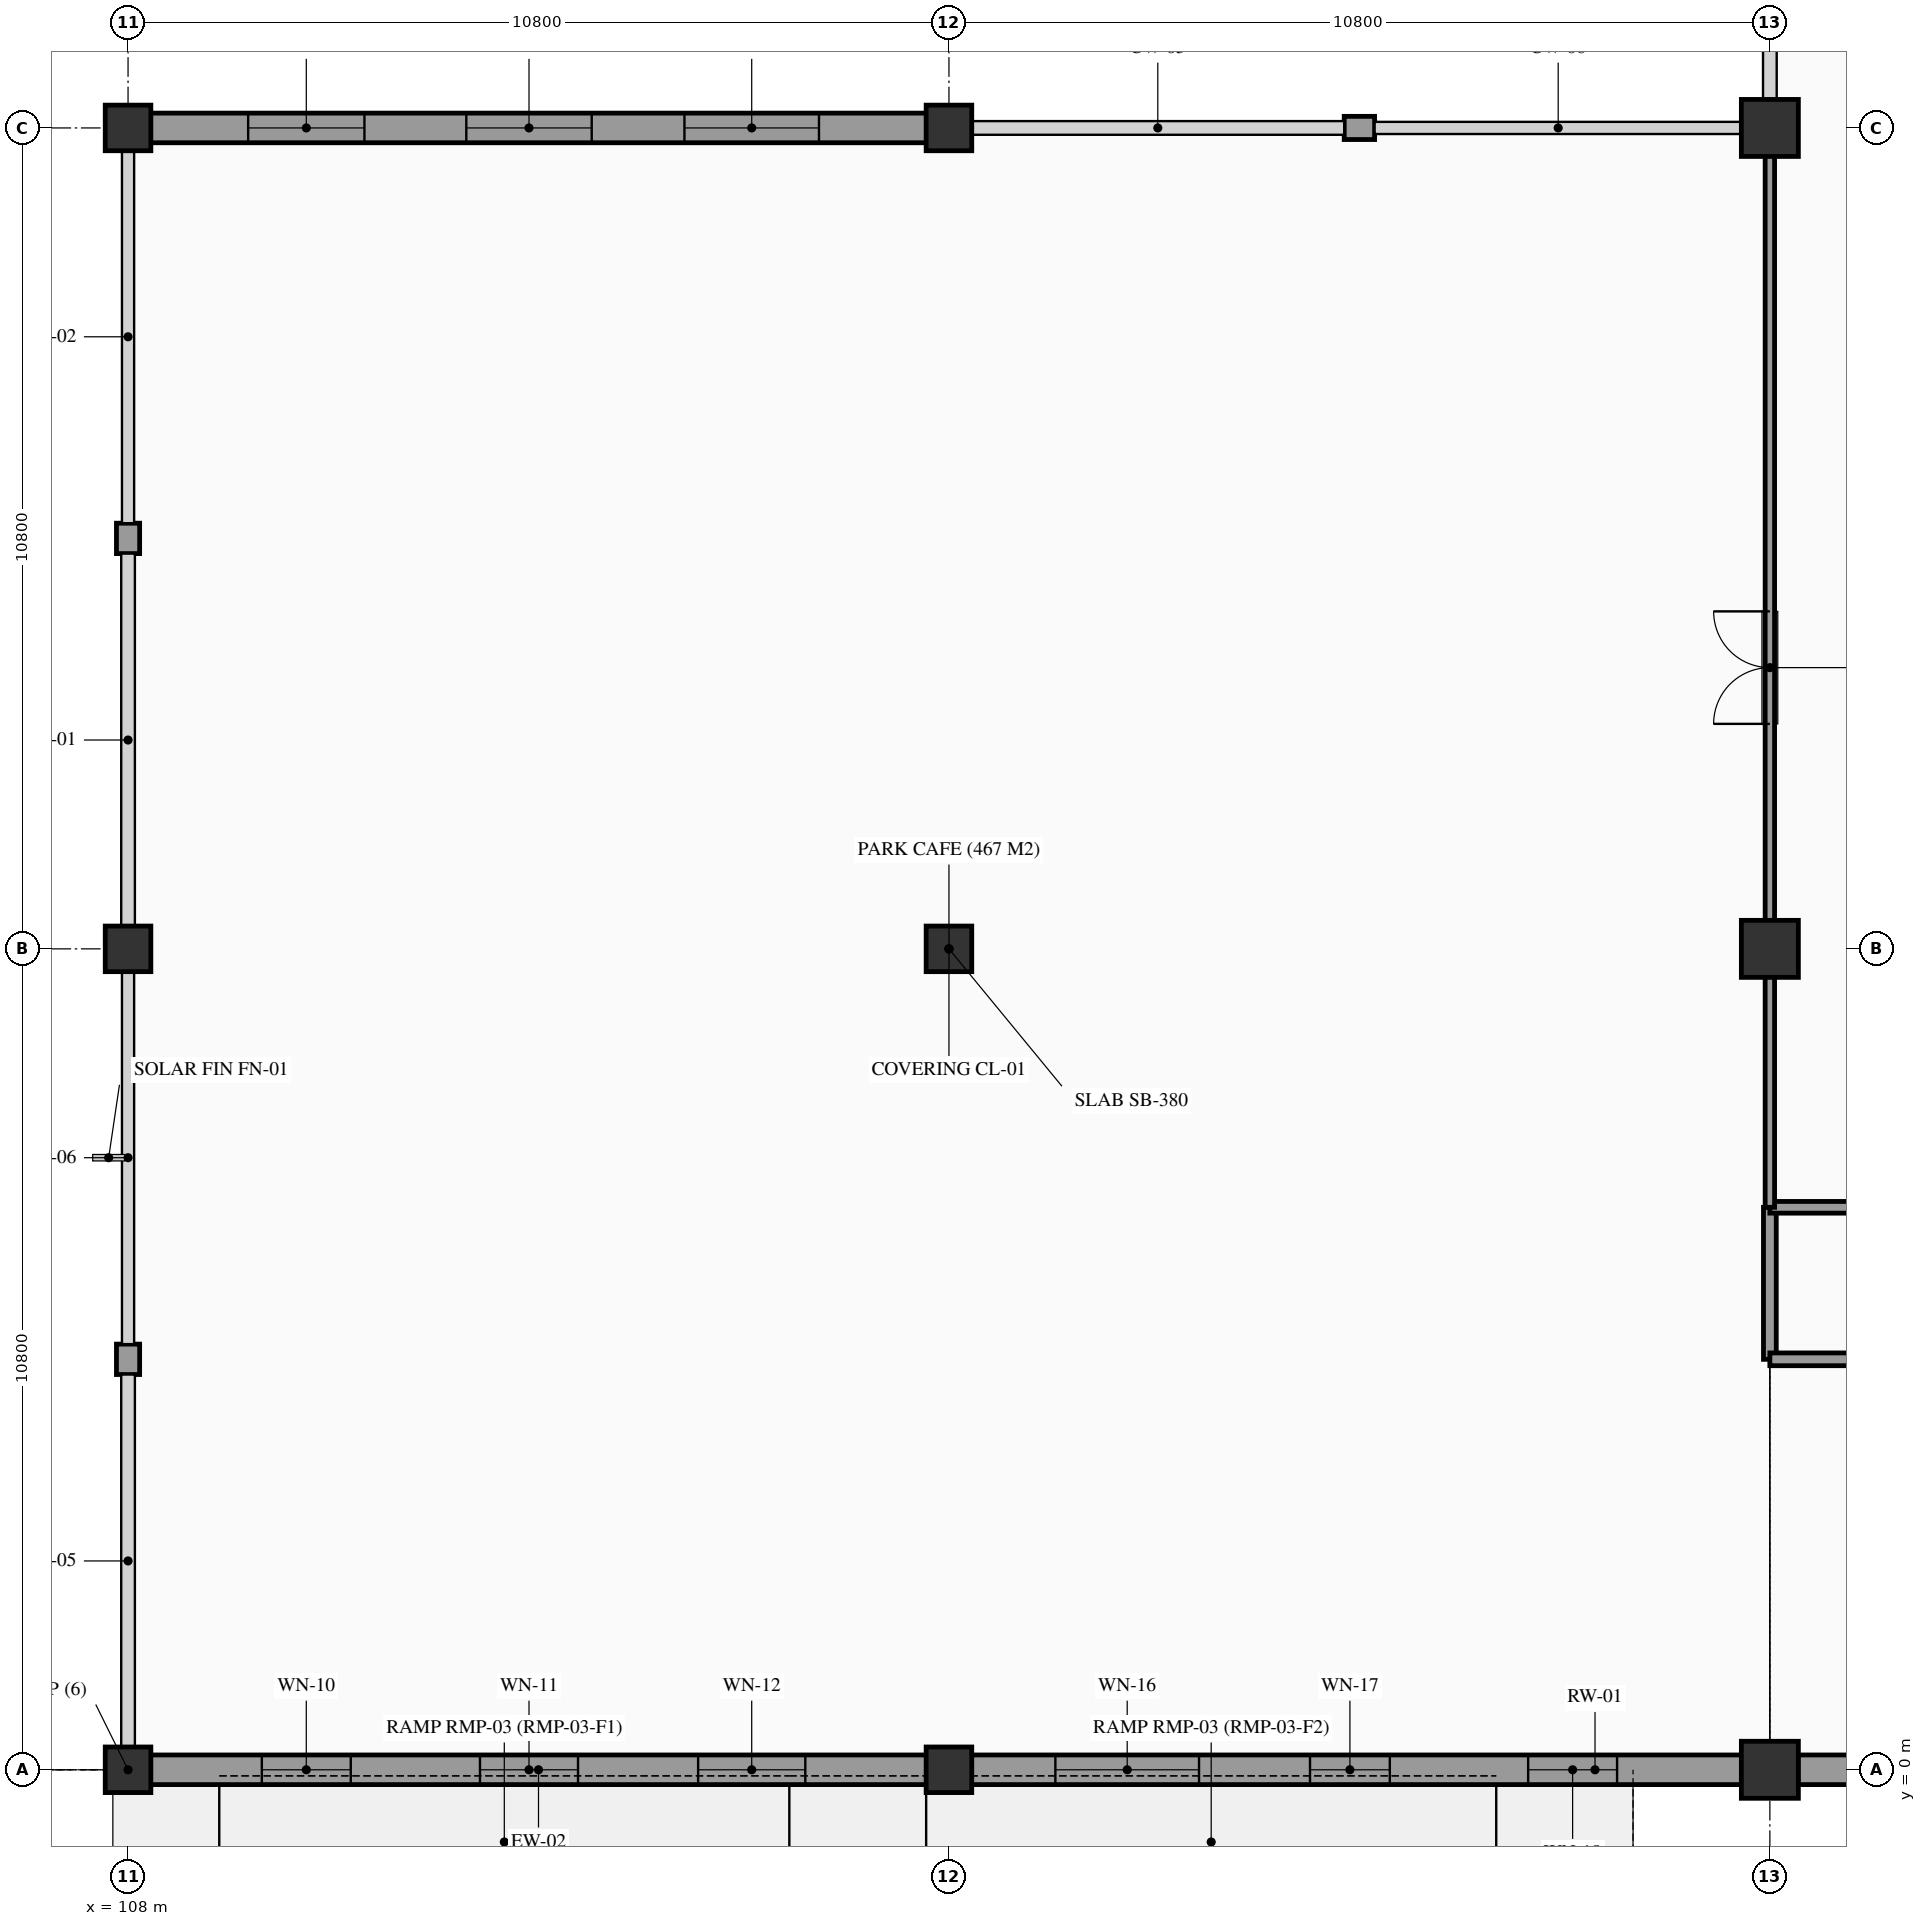
"""IFC4 building model, lengths in metres.
Left out: names, types, materials, properties, quantities, classifications, styles, units other than length and angle.
Written with IfcOpenShell. Run it as: python <this file> out.ifc"""

import sys

from ifc_helpers import new_model, si_unit, direction, frame, frame_2d, origin, origin_2d, place, context, subcontext, project, spatial, rectangle, extrude, element, fill, save


model = new_model("IFC4")
c1 = context("Model", 3, precision=1e-05, world=origin(), true_north=direction((0.0, 1.0)))
c2 = subcontext(c1, "Body", "Model", "MODEL_VIEW")
j1 = project(units=[si_unit("LENGTHUNIT", "METRE"), si_unit("PLANEANGLEUNIT", "RADIAN")], contexts=[c1])
p1 = place(None, origin())
s1 = spatial("IfcSite", under=j1, at=p1, CompositionType="ELEMENT")
p2 = place(p1, origin())
s2 = spatial("IfcBuilding", under=s1, at=p2, CompositionType="ELEMENT")
p3 = place(p2, origin())
s3 = spatial("IfcBuildingStorey", under=s2, at=p3, CompositionType="ELEMENT", Elevation=0.0)
for number, where, z_axis, x_axis in (
    (1, (108.0, 0.0, -1.2), (0.0, 0.0, 1.0), (1.0, 0.0, 0.0)),
    (2, (108.0, 10.8, -1.2), (0.0, 0.0, 1.0), (1.0, 0.0, 0.0)),
    (3, (108.0, 21.6, -1.2), (0.0, 0.0, 1.0), (1.0, 0.0, 0.0)),
    (4, (118.8, 0.0, -1.2), (0.0, 0.0, 1.0), (1.0, 0.0, 0.0)),
    (5, (118.8, 10.8, -1.2), (0.0, 0.0, 1.0), (1.0, 0.0, 0.0)),
    (6, (118.8, 21.6, -1.2), (0.0, 0.0, 1.0), (1.0, 0.0, 0.0)),
):
    element("IfcColumn", number, at=place(p3, frame(where, z_axis=z_axis, x_axis=x_axis)), inside=s3, PredefinedType="COLUMN", context=c2, shape_type="SweptSolid", body=[
        extrude(rectangle(XDim=0.6, YDim=0.6, at=origin_2d()), origin(), (0.0, 0.0, 1.0), 6.6),
    ])
for number, where, z_axis, x_axis in (
    (7, (129.6, 0.0, -1.2), (0.0, 0.0, 1.0), (1.0, 0.0, 0.0)),
    (8, (129.6, 10.8, -1.2), (0.0, 0.0, 1.0), (1.0, 0.0, 0.0)),
    (9, (129.6, 21.6, -1.2), (0.0, 0.0, 1.0), (1.0, 0.0, 0.0)),
):
    element("IfcColumn", number, at=place(p3, frame(where, z_axis=z_axis, x_axis=x_axis)), inside=s3, PredefinedType="COLUMN", context=c2, shape_type="SweptSolid", body=[
        extrude(rectangle(XDim=0.75, YDim=0.75, at=origin_2d()), origin(), (0.0, 0.0, 1.0), 6.6),
    ])
p4 = place(p3, frame((108.45, 0.0, -1.2), z_axis=(0.0, 0.0, 1.0), x_axis=(1.0, 0.0, 0.0)))
e10 = element("IfcWall", 10, at=p4, inside=s3, PredefinedType="USERDEFINED", context=c2, shape_type="SweptSolid", body=[
    extrude(rectangle(XDim=107.1, YDim=0.334, at=frame_2d((53.55, 0.0))), origin(), (0.0, 0.0, 1.0), 0.14),
])
p5 = place(p3, frame((108.295, 0.0, 0.0), z_axis=(0.0, 0.0, 1.0), x_axis=(1.0, 0.0, 0.0)))
e11 = element("IfcWall", 11, at=p5, inside=s3, PredefinedType="STANDARD", context=c2, shape_type="SweptSolid", body=[
    extrude(rectangle(XDim=10.21, YDim=0.39, at=frame_2d((5.105, 0.0))), origin(), (0.0, 0.0, 1.0), 4.198),
])
p6 = place(p5, frame((1.465, 0.0, 0.95)))
e12 = element("IfcOpeningElement", 12, at=p6, cuts=e11, PredefinedType="OPENING", context=c2, shape_type="SweptSolid", body=[
    extrude(rectangle(XDim=1.17, YDim=1.05, at=frame_2d((0.585, 0.525))), frame((0.0, 0.205, 0.0), z_axis=(0.0, -1.0, 0.0), x_axis=(1.0, 0.0, 0.0)), (0.0, 0.0, 1.0), 0.41),
])
p7 = place(p5, frame((4.335, 0.0, 0.95)))
e13 = element("IfcOpeningElement", 13, at=p7, cuts=e11, PredefinedType="OPENING", context=c2, shape_type="SweptSolid", body=[
    extrude(rectangle(XDim=1.29, YDim=1.05, at=frame_2d((0.645, 0.525))), frame((0.0, 0.205, 0.0), z_axis=(0.0, -1.0, 0.0), x_axis=(1.0, 0.0, 0.0)), (0.0, 0.0, 1.0), 0.41),
])
p8 = place(p5, frame((7.205, 0.0, 0.95)))
e14 = element("IfcOpeningElement", 14, at=p8, cuts=e11, PredefinedType="OPENING", context=c2, shape_type="SweptSolid", body=[
    extrude(rectangle(XDim=1.41, YDim=1.05, at=frame_2d((0.705, 0.525))), frame((0.0, 0.205, 0.0), z_axis=(0.0, -1.0, 0.0), x_axis=(1.0, 0.0, 0.0)), (0.0, 0.0, 1.0), 0.41),
])
p9 = place(p3, frame((108.0, 5.2, 0.0), z_axis=(0.0, 0.0, 1.0), x_axis=(0.0, 1.0, 0.0)))
e15 = element("IfcWall", 15, at=p9, inside=s3, PredefinedType="STANDARD", context=c2, shape_type="SweptSolid", body=[
    extrude(rectangle(XDim=0.4, YDim=0.305, at=frame_2d((0.2, 0.0))), origin(), (0.0, 0.0, 1.0), 4.25),
])
p10 = place(p3, frame((108.295, 21.6, 0.0), z_axis=(0.0, 0.0, 1.0), x_axis=(1.0, 0.0, 0.0)))
e16 = element("IfcWall", 16, at=p10, inside=s3, PredefinedType="STANDARD", context=c2, shape_type="SweptSolid", body=[
    extrude(rectangle(XDim=10.21, YDim=0.39, at=frame_2d((5.105, 0.0))), origin(), (0.0, 0.0, 1.0), 4.198),
])
p11 = place(p10, frame((1.285, 0.0, 0.95)))
e17 = element("IfcOpeningElement", 17, at=p11, cuts=e16, PredefinedType="OPENING", context=c2, shape_type="SweptSolid", body=[
    extrude(rectangle(XDim=1.53, YDim=1.05, at=frame_2d((0.765, 0.525))), frame((0.0, 0.205, 0.0), z_axis=(0.0, -1.0, 0.0), x_axis=(1.0, 0.0, 0.0)), (0.0, 0.0, 1.0), 0.41),
])
p12 = place(p10, frame((4.155, 0.0, 0.95)))
e18 = element("IfcOpeningElement", 18, at=p12, cuts=e16, PredefinedType="OPENING", context=c2, shape_type="SweptSolid", body=[
    extrude(rectangle(XDim=1.65, YDim=1.05, at=frame_2d((0.825, 0.525))), frame((0.0, 0.205, 0.0), z_axis=(0.0, -1.0, 0.0), x_axis=(1.0, 0.0, 0.0)), (0.0, 0.0, 1.0), 0.41),
])
p13 = place(p10, frame((7.025, 0.0, 0.95)))
e19 = element("IfcOpeningElement", 19, at=p13, cuts=e16, PredefinedType="OPENING", context=c2, shape_type="SweptSolid", body=[
    extrude(rectangle(XDim=1.77, YDim=1.05, at=frame_2d((0.885, 0.525))), frame((0.0, 0.205, 0.0), z_axis=(0.0, -1.0, 0.0), x_axis=(1.0, 0.0, 0.0)), (0.0, 0.0, 1.0), 0.41),
])
p14 = place(p3, frame((108.0, 16.0, 0.0), z_axis=(0.0, 0.0, 1.0), x_axis=(0.0, 1.0, 0.0)))
e20 = element("IfcWall", 20, at=p14, inside=s3, PredefinedType="STANDARD", context=c2, shape_type="SweptSolid", body=[
    extrude(rectangle(XDim=0.4, YDim=0.305, at=frame_2d((0.2, 0.0))), origin(), (0.0, 0.0, 1.0), 4.25),
])
p15 = place(p3, frame((119.095, 0.0, 0.0), z_axis=(0.0, 0.0, 1.0), x_axis=(1.0, 0.0, 0.0)))
e21 = element("IfcWall", 21, at=p15, inside=s3, PredefinedType="STANDARD", context=c2, shape_type="SweptSolid", body=[
    extrude(rectangle(XDim=10.135, YDim=0.39, at=frame_2d((5.067, 0.0))), origin(), (0.0, 0.0, 1.0), 4.198),
])
p16 = place(p15, frame((1.105, 0.0, 0.95)))
e22 = element("IfcOpeningElement", 22, at=p16, cuts=e21, PredefinedType="OPENING", context=c2, shape_type="SweptSolid", body=[
    extrude(rectangle(XDim=1.89, YDim=1.05, at=frame_2d((0.945, 0.525))), frame((0.0, 0.205, 0.0), z_axis=(0.0, -1.0, 0.0), x_axis=(1.0, 0.0, 0.0)), (0.0, 0.0, 1.0), 0.41),
])
p17 = place(p15, frame((4.455, 0.0, 0.95)))
e23 = element("IfcOpeningElement", 23, at=p17, cuts=e21, PredefinedType="OPENING", context=c2, shape_type="SweptSolid", body=[
    extrude(rectangle(XDim=1.05, YDim=1.2, at=frame_2d((0.525, 0.6))), frame((0.0, 0.205, 0.0), z_axis=(0.0, -1.0, 0.0), x_axis=(1.0, 0.0, 0.0)), (0.0, 0.0, 1.0), 0.41),
])
p18 = place(p15, frame((7.325, 0.0, 0.95)))
e24 = element("IfcOpeningElement", 24, at=p18, cuts=e21, PredefinedType="OPENING", context=c2, shape_type="SweptSolid", body=[
    extrude(rectangle(XDim=1.17, YDim=1.2, at=frame_2d((0.585, 0.6))), frame((0.0, 0.205, 0.0), z_axis=(0.0, -1.0, 0.0), x_axis=(1.0, 0.0, 0.0)), (0.0, 0.0, 1.0), 0.41),
])
p19 = place(p3, frame((124.0, 21.6, 0.0), z_axis=(0.0, 0.0, 1.0), x_axis=(1.0, 0.0, 0.0)))
e25 = element("IfcWall", 25, at=p19, inside=s3, PredefinedType="STANDARD", context=c2, shape_type="SweptSolid", body=[
    extrude(rectangle(XDim=0.4, YDim=0.305, at=frame_2d((0.2, 0.0))), origin(), (0.0, 0.0, 1.0), 4.198),
])
p20 = place(p3, frame((129.97, 0.0, 0.0), z_axis=(0.0, 0.0, 1.0), x_axis=(1.0, 0.0, 0.0)))
e26 = element("IfcWall", 26, at=p20, inside=s3, PredefinedType="STANDARD", context=c2, shape_type="SweptSolid", body=[
    extrude(rectangle(XDim=10.06, YDim=0.39, at=frame_2d((5.03, 0.0))), origin(), (0.0, 0.0, 1.0), 4.198),
])
p21 = place(p20, frame((4.07, 0.0, 0.0)))
e27 = element("IfcOpeningElement", 27, at=p21, cuts=e26, PredefinedType="OPENING", context=c2, shape_type="SweptSolid", body=[
    extrude(rectangle(XDim=1.92, YDim=2.35, at=frame_2d((0.96, 1.175))), frame((0.0, 0.205, 0.0), z_axis=(0.0, -1.0, 0.0), x_axis=(1.0, 0.0, 0.0)), (0.0, 0.0, 1.0), 0.41),
])
p22 = place(p3, frame((129.6, 5.4, 0.0), z_axis=(0.0, 0.0, 1.0), x_axis=(0.0, 1.0, 0.0)))
e28 = element("IfcWall", 28, at=p22, inside=s3, PredefinedType="PARTITIONING", context=c2, shape_type="SweptSolid", body=[
    extrude(rectangle(XDim=2.0, YDim=0.168, at=frame_2d((1.0, 0.0))), origin(), (0.0, 0.0, 1.0), 3.95),
])
p23 = place(p3, frame((129.6, 7.4, 0.0), z_axis=(0.0, 0.0, 1.0), x_axis=(1.0, 0.0, 0.0)))
e29 = element("IfcWall", 29, at=p23, inside=s3, PredefinedType="PARTITIONING", context=c2, shape_type="SweptSolid", body=[
    extrude(rectangle(XDim=21.6, YDim=0.154, at=frame_2d((10.8, 0.0))), origin(), (0.0, 0.0, 1.0), 3.95),
])
p24 = place(p3, frame((129.6, 5.4, 0.0), z_axis=(0.0, 0.0, 1.0), x_axis=(1.0, 0.0, 0.0)))
e30 = element("IfcWall", 30, at=p24, inside=s3, PredefinedType="PARTITIONING", context=c2, shape_type="SweptSolid", body=[
    extrude(rectangle(XDim=1.93, YDim=0.168, at=frame_2d((0.965, 0.0))), origin(), (0.0, 0.0, 1.0), 3.95),
])
p25 = place(p3, frame((129.6, 7.4, 0.0), z_axis=(0.0, 0.0, 1.0), x_axis=(0.0, 1.0, 0.0)))
e31 = element("IfcWall", 31, at=p25, inside=s3, PredefinedType="PARTITIONING", context=c2, shape_type="SweptSolid", body=[
    extrude(rectangle(XDim=14.2, YDim=0.124, at=frame_2d((7.1, 0.0))), origin(), (0.0, 0.0, 1.0), 3.95),
])
p26 = place(p25, frame((6.36, 0.0, 0.0)))
e32 = element("IfcOpeningElement", 32, at=p26, cuts=e31, PredefinedType="OPENING", context=c2, shape_type="SweptSolid", body=[
    extrude(rectangle(XDim=1.48, YDim=2.2, at=frame_2d((0.74, 1.1))), frame((0.0, 0.072, 0.0), z_axis=(0.0, -1.0, 0.0), x_axis=(1.0, 0.0, 0.0)), (0.0, 0.0, 1.0), 0.144),
])
p27 = place(p6, frame((1.17, 0.0, 0.0), z_axis=(0.0, 0.0, 1.0), x_axis=(-1.0, 0.0, 0.0)))
e33 = element("IfcWindow", 33, at=p27, inside=s3, PartitioningType="SINGLE_PANEL", PredefinedType="WINDOW", context=c2, shape_type="SweptSolid", body=[
    extrude(rectangle(XDim=1.17, YDim=1.05, at=frame_2d((0.585, 0.525))), frame((0.0, 0.03, 0.0), z_axis=(0.0, -1.0, 0.0), x_axis=(1.0, 0.0, 0.0)), (0.0, 0.0, 1.0), 0.06),
])
fill(e12, e33)
p28 = place(p7, frame((1.29, 0.0, 0.0), z_axis=(0.0, 0.0, 1.0), x_axis=(-1.0, 0.0, 0.0)))
e34 = element("IfcWindow", 34, at=p28, inside=s3, PartitioningType="SINGLE_PANEL", PredefinedType="WINDOW", context=c2, shape_type="SweptSolid", body=[
    extrude(rectangle(XDim=1.29, YDim=1.05, at=frame_2d((0.645, 0.525))), frame((0.0, 0.03, 0.0), z_axis=(0.0, -1.0, 0.0), x_axis=(1.0, 0.0, 0.0)), (0.0, 0.0, 1.0), 0.06),
])
fill(e13, e34)
p29 = place(p8, frame((1.41, 0.0, 0.0), z_axis=(0.0, 0.0, 1.0), x_axis=(-1.0, 0.0, 0.0)))
e35 = element("IfcWindow", 35, at=p29, inside=s3, PartitioningType="SINGLE_PANEL", PredefinedType="WINDOW", context=c2, shape_type="SweptSolid", body=[
    extrude(rectangle(XDim=1.41, YDim=1.05, at=frame_2d((0.705, 0.525))), frame((0.0, 0.03, 0.0), z_axis=(0.0, -1.0, 0.0), x_axis=(1.0, 0.0, 0.0)), (0.0, 0.0, 1.0), 0.06),
])
fill(e14, e35)
p30 = place(p11, origin())
e36 = element("IfcWindow", 36, at=p30, inside=s3, PartitioningType="SINGLE_PANEL", PredefinedType="WINDOW", context=c2, shape_type="SweptSolid", body=[
    extrude(rectangle(XDim=1.53, YDim=1.05, at=frame_2d((0.765, 0.525))), frame((0.0, 0.03, 0.0), z_axis=(0.0, -1.0, 0.0), x_axis=(1.0, 0.0, 0.0)), (0.0, 0.0, 1.0), 0.06),
])
fill(e17, e36)
p31 = place(p12, origin())
e37 = element("IfcWindow", 37, at=p31, inside=s3, PartitioningType="SINGLE_PANEL", PredefinedType="WINDOW", context=c2, shape_type="SweptSolid", body=[
    extrude(rectangle(XDim=1.65, YDim=1.05, at=frame_2d((0.825, 0.525))), frame((0.0, 0.03, 0.0), z_axis=(0.0, -1.0, 0.0), x_axis=(1.0, 0.0, 0.0)), (0.0, 0.0, 1.0), 0.06),
])
fill(e18, e37)
p32 = place(p13, origin())
e38 = element("IfcWindow", 38, at=p32, inside=s3, PartitioningType="SINGLE_PANEL", PredefinedType="WINDOW", context=c2, shape_type="SweptSolid", body=[
    extrude(rectangle(XDim=1.77, YDim=1.05, at=frame_2d((0.885, 0.525))), frame((0.0, 0.03, 0.0), z_axis=(0.0, -1.0, 0.0), x_axis=(1.0, 0.0, 0.0)), (0.0, 0.0, 1.0), 0.06),
])
fill(e19, e38)
p33 = place(p16, frame((1.89, 0.0, 0.0), z_axis=(0.0, 0.0, 1.0), x_axis=(-1.0, 0.0, 0.0)))
e39 = element("IfcWindow", 39, at=p33, inside=s3, PartitioningType="SINGLE_PANEL", PredefinedType="WINDOW", context=c2, shape_type="SweptSolid", body=[
    extrude(rectangle(XDim=1.89, YDim=1.05, at=frame_2d((0.945, 0.525))), frame((0.0, 0.03, 0.0), z_axis=(0.0, -1.0, 0.0), x_axis=(1.0, 0.0, 0.0)), (0.0, 0.0, 1.0), 0.06),
])
fill(e22, e39)
p34 = place(p17, frame((1.05, 0.0, 0.0), z_axis=(0.0, 0.0, 1.0), x_axis=(-1.0, 0.0, 0.0)))
e40 = element("IfcWindow", 40, at=p34, inside=s3, PartitioningType="SINGLE_PANEL", PredefinedType="WINDOW", context=c2, shape_type="SweptSolid", body=[
    extrude(rectangle(XDim=1.05, YDim=1.2, at=frame_2d((0.525, 0.6))), frame((0.0, 0.03, 0.0), z_axis=(0.0, -1.0, 0.0), x_axis=(1.0, 0.0, 0.0)), (0.0, 0.0, 1.0), 0.06),
])
fill(e23, e40)
p35 = place(p18, frame((1.17, 0.0, 0.0), z_axis=(0.0, 0.0, 1.0), x_axis=(-1.0, 0.0, 0.0)))
e41 = element("IfcWindow", 41, at=p35, inside=s3, PartitioningType="SINGLE_PANEL", PredefinedType="WINDOW", context=c2, shape_type="SweptSolid", body=[
    extrude(rectangle(XDim=1.17, YDim=1.2, at=frame_2d((0.585, 0.6))), frame((0.0, 0.03, 0.0), z_axis=(0.0, -1.0, 0.0), x_axis=(1.0, 0.0, 0.0)), (0.0, 0.0, 1.0), 0.06),
])
fill(e24, e41)
p36 = place(p26, origin())
e42 = element("IfcDoor", 42, at=p36, inside=s3, OperationType="DOUBLE_DOOR_SINGLE_SWING", PredefinedType="DOOR", context=c2, shape_type="SweptSolid", body=[
    extrude(rectangle(XDim=1.48, YDim=2.2, at=frame_2d((0.74, 1.1))), frame((0.0, 0.025, 0.0), z_axis=(0.0, -1.0, 0.0), x_axis=(1.0, 0.0, 0.0)), (0.0, 0.0, 1.0), 0.05),
])
fill(e32, e42)
save(model, sys.argv[1])
